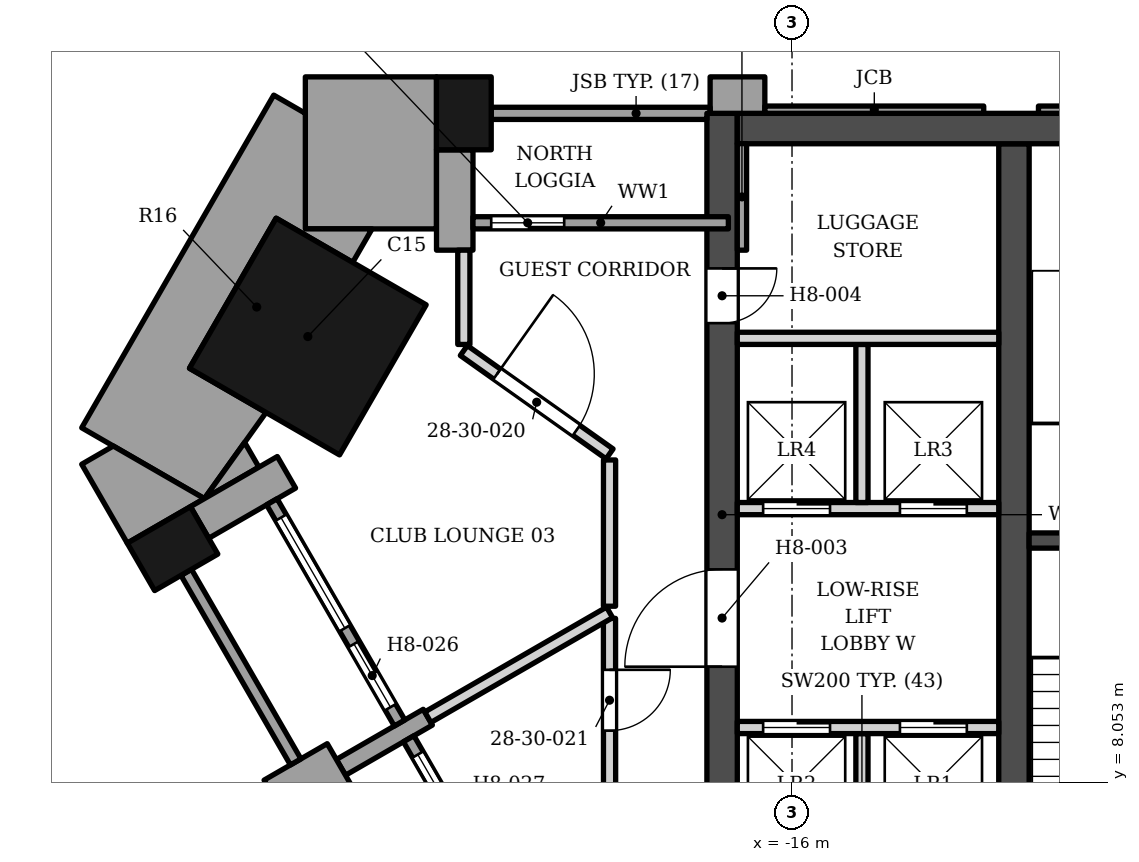
"""IFC4 building model, lengths in metres.
Left out: names, types, materials, properties, quantities, classifications, styles, units other than length and angle.
Written with IfcOpenShell. Run it as: python <this file> out.ifc"""

import sys

from ifc_helpers import new_model, si_unit, direction, frame, frame_2d, origin, origin_2d, place, context, subcontext, project, spatial, polyline, rectangle, outline, extrude, element, fill, save


model = new_model("IFC4")
c1 = context("Model", 3, precision=1e-05, world=origin(), true_north=direction((0.0, 1.0)))
c2 = subcontext(c1, "Body", "Model", "MODEL_VIEW")
j1 = project(units=[si_unit("LENGTHUNIT", "METRE"), si_unit("PLANEANGLEUNIT", "RADIAN")], contexts=[c1])
p1 = place(None, origin())
s1 = spatial("IfcSite", under=j1, at=p1, CompositionType="ELEMENT")
p2 = place(p1, origin())
s2 = spatial("IfcBuilding", under=s1, at=p2, CompositionType="ELEMENT")
p3 = place(p2, frame((0.0, 0.0, 122.4)))
s3 = spatial("IfcBuildingStorey", under=s2, at=p3, CompositionType="ELEMENT", Elevation=122.4)
p4 = place(p3, frame((-16.9, 18.802, 0.0), z_axis=(0.0, 0.0, 1.0), x_axis=(1.0, 0.0, 0.0)))
e1 = element("IfcWall", 1, at=p4, inside=s3, PredefinedType="SHEAR", context=c2, shape_type="SweptSolid", body=[
    extrude(rectangle(XDim=33.8, YDim=0.5, at=frame_2d((16.9, 0.0))), origin(), (0.0, 0.0, 1.0), 3.4),
])
p5 = place(p3, frame((-12.35, 5.253, 0.0), z_axis=(0.0, 0.0, 1.0), x_axis=(0.0, 1.0, 0.0)))
e2 = element("IfcWall", 2, at=p5, inside=s3, PredefinedType="SHEAR", context=c2, shape_type="SweptSolid", body=[
    extrude(rectangle(XDim=13.3, YDim=0.5, at=frame_2d((6.65, 0.0))), origin(), (0.0, 0.0, 1.0), 3.4),
])
p6 = place(p3, frame((-12.1, 12.028, 0.0), z_axis=(0.0, 0.0, 1.0), x_axis=(1.0, 0.0, 0.0)))
e3 = element("IfcWall", 3, at=p6, inside=s3, PredefinedType="SHEAR", context=c2, shape_type="SweptSolid", body=[
    extrude(rectangle(XDim=3.75, YDim=0.25, at=frame_2d((1.875, 0.0))), origin(), (0.0, 0.0, 1.0), 3.4),
])
p7 = place(p3, frame((-17.15, 5.853, 0.0), z_axis=(0.0, 0.0, 1.0), x_axis=(0.0, 1.0, 0.0)))
e4 = element("IfcWall", 4, at=p7, inside=s3, PredefinedType="SHEAR", context=c2, shape_type="SweptSolid", body=[
    extrude(rectangle(XDim=13.2, YDim=0.5, at=frame_2d((6.6, 0.0))), origin(), (0.0, 0.0, 1.0), 3.4),
])
p8 = place(p7, frame((4.1, 0.0, 0.0)))
e5 = element("IfcOpeningElement", 5, at=p8, cuts=e4, PredefinedType="OPENING", context=c2, shape_type="SweptSolid", body=[
    extrude(rectangle(XDim=1.6, YDim=2.1, at=frame_2d((0.8, 1.05))), frame((0.0, 0.26, 0.0), z_axis=(0.0, -1.0, 0.0), x_axis=(1.0, 0.0, 0.0)), (0.0, 0.0, 1.0), 0.52),
])
p9 = place(p7, frame((9.75, 0.0, 0.0)))
e6 = element("IfcOpeningElement", 6, at=p9, cuts=e4, PredefinedType="OPENING", context=c2, shape_type="SweptSolid", body=[
    extrude(rectangle(XDim=0.9, YDim=2.1, at=frame_2d((0.45, 1.05))), frame((0.0, 0.26, 0.0), z_axis=(0.0, -1.0, 0.0), x_axis=(1.0, 0.0, 0.0)), (0.0, 0.0, 1.0), 0.52),
])
p10 = place(p3, frame((-23.963, 15.382, 0.0), z_axis=(0.0, 0.0, 1.0), x_axis=(0.866025403784, -0.5, 0.0)))
e7 = element("IfcColumn", 7, at=p10, inside=s3, PredefinedType="COLUMN", context=c2, shape_type="SweptSolid", body=[
    extrude(rectangle(XDim=2.85, YDim=2.85, at=origin_2d()), origin(), (0.0, 0.0, 1.0), 3.4),
])
for number, where, z_axis, x_axis in (
    (8, (-26.188, 11.894, 0.0), (0.0, 0.0, 1.0), (0.5, -0.866, 0.0)),
    (9, (-21.397, 19.053, 0.0), (0.0, 0.0, 1.0), (-1.0, 0.0, 0.0)),
):
    element("IfcColumn", number, at=place(p3, frame(where, z_axis=z_axis, x_axis=x_axis)), inside=s3, PredefinedType="COLUMN", context=c2, shape_type="SweptSolid", body=[
        extrude(rectangle(XDim=0.9, YDim=1.2, at=origin_2d()), origin(), (0.0, 0.0, 1.0), 3.4),
    ])
p11 = place(p3, frame((-25.744, 12.324, 0.0), z_axis=(0.0, 0.0, 1.0), x_axis=(0.865976140824, 0.500085316245, 0.0)))
e10 = element("IfcWall", 10, at=p11, inside=s3, PredefinedType="SOLIDWALL", context=c2, shape_type="SweptSolid", body=[
    extrude(rectangle(XDim=1.65, YDim=0.6, at=frame_2d((0.825, 0.0))), origin(), (0.0, 0.0, 1.0), 2.63),
])
p12 = place(p3, frame((-24.458, 7.697, 0.0), z_axis=(0.0, 0.0, 1.0), x_axis=(0.865955154139, 0.50012165622, 0.0)))
e11 = element("IfcWall", 11, at=p12, inside=s3, PredefinedType="SOLIDWALL", context=c2, shape_type="SweptSolid", body=[
    extrude(rectangle(XDim=1.2, YDim=0.9, at=frame_2d((0.6, 0.0))), origin(), (0.0, 0.0, 1.0), 2.63),
])
p13 = place(p3, frame((-23.419, 8.297, 0.0), z_axis=(0.0, 0.0, 1.0), x_axis=(0.866040211805, 0.499974350878, 0.0)))
e12 = element("IfcWall", 12, at=p13, inside=s3, PredefinedType="SOLIDWALL", context=c2, shape_type="SweptSolid", body=[
    extrude(rectangle(XDim=1.65, YDim=0.3, at=frame_2d((0.825, 0.0))), origin(), (0.0, 0.0, 1.0), 2.65),
])
p14 = place(p3, frame((-25.963, 11.505, 0.0), z_axis=(0.0, 0.0, 1.0), x_axis=(0.500012057535, -0.866018442252, 0.0)))
e13 = element("IfcWall", 13, at=p14, inside=s3, PredefinedType="SOLIDWALL", context=c2, shape_type="SweptSolid", body=[
    extrude(rectangle(XDim=3.6, YDim=0.2, at=frame_2d((1.8, 0.0))), origin(), (0.0, 0.0, 1.0), 2.63),
])
p15 = place(p3, frame((-24.554, 12.665, 0.0), z_axis=(0.0, 0.0, 1.0), x_axis=(0.500002543286, -0.866023935413, 0.0)))
e14 = element("IfcWall", 14, at=p15, inside=s3, PredefinedType="ELEMENTEDWALL", context=c2, shape_type="SweptSolid", body=[
    extrude(rectangle(XDim=4.2, YDim=0.2, at=frame_2d((2.1, 0.0))), origin(), (0.0, 0.0, 1.0), 2.65),
])
p16 = place(p15, frame((0.3, 0.0, 0.6)))
e15 = element("IfcOpeningElement", 15, at=p16, cuts=e14, PredefinedType="OPENING", context=c2, shape_type="SweptSolid", body=[
    extrude(rectangle(XDim=2.1, YDim=1.8, at=frame_2d((1.05, 0.9))), frame((0.0, 0.11, 0.0), z_axis=(0.0, -1.0, 0.0), x_axis=(1.0, 0.0, 0.0)), (0.0, 0.0, 1.0), 0.22),
])
p17 = place(p15, frame((2.7, 0.0, 0.0)))
e16 = element("IfcOpeningElement", 16, at=p17, cuts=e14, PredefinedType="OPENING", context=c2, shape_type="SweptSolid", body=[
    extrude(rectangle(XDim=1.2, YDim=2.4, at=frame_2d((0.6, 1.2))), frame((0.0, 0.11, 0.0), z_axis=(0.0, -1.0, 0.0), x_axis=(1.0, 0.0, 0.0)), (0.0, 0.0, 1.0), 0.22),
])
p18 = place(p3, frame((-22.304, 8.767, 0.0), z_axis=(0.0, 0.0, 1.0), x_axis=(0.500027713859, -0.866009402589, 0.0)))
e17 = element("IfcWall", 17, at=p18, inside=s3, PredefinedType="ELEMENTEDWALL", context=c2, shape_type="SweptSolid", body=[
    extrude(rectangle(XDim=4.2, YDim=0.2, at=frame_2d((2.1, 0.0))), origin(), (0.0, 0.0, 1.0), 2.65),
])
p19 = place(p18, frame((0.3, 0.0, 0.6)))
e18 = element("IfcOpeningElement", 18, at=p19, cuts=e17, PredefinedType="OPENING", context=c2, shape_type="SweptSolid", body=[
    extrude(rectangle(XDim=2.1, YDim=1.8, at=frame_2d((1.05, 0.9))), frame((0.0, 0.11, 0.0), z_axis=(0.0, -1.0, 0.0), x_axis=(1.0, 0.0, 0.0)), (0.0, 0.0, 1.0), 0.22),
])
p20 = place(p18, frame((2.7, 0.0, 0.0)))
e19 = element("IfcOpeningElement", 19, at=p20, cuts=e17, PredefinedType="OPENING", context=c2, shape_type="SweptSolid", body=[
    extrude(rectangle(XDim=1.2, YDim=2.4, at=frame_2d((0.6, 1.2))), frame((0.0, 0.11, 0.0), z_axis=(0.0, -1.0, 0.0), x_axis=(1.0, 0.0, 0.0)), (0.0, 0.0, 1.0), 0.22),
])
p21 = place(p3, origin())
e20 = element("IfcWall", 20, at=p21, inside=s3, PredefinedType="SOLIDWALL", context=c2, shape_type="SweptSolid", body=[
    extrude(outline(polyline([(-16.447, 19.052), (-16.447, 19.653), (-17.347, 19.653), (-17.347, 19.052), (-16.447, 19.052)])), origin(), (0.0, 0.0, 1.0), 2.65),
])
p22 = place(p3, origin())
e21 = element("IfcWall", 21, at=p22, inside=s3, PredefinedType="SOLIDWALL", context=c2, shape_type="SweptSolid", body=[
    extrude(outline(polyline([(-16.9, 18.555), (-16.747, 18.555), (-16.747, 16.802), (-16.9, 16.802), (-16.9, 18.555)])), origin(), (0.0, 0.0, 1.0), 2.65),
])
p23 = place(p3, origin())
e22 = element("IfcWall", 22, at=p23, inside=s3, PredefinedType="SOLIDWALL", context=c2, shape_type="SweptSolid", body=[
    extrude(outline(polyline([(-21.847, 18.453), (-21.847, 16.802), (-21.247, 16.802), (-21.247, 18.453), (-21.847, 18.453)])), origin(), (0.0, 0.0, 1.0), 2.63),
])
p24 = place(p3, origin())
e23 = element("IfcWall", 23, at=p24, inside=s3, PredefinedType="ELEMENTEDWALL", context=c2, shape_type="SweptSolid", body=[
    extrude(outline(polyline([(-11.947, 19.173), (-11.947, 19.052), (-8.347, 19.052), (-8.347, 19.173), (-11.947, 19.173)])), origin(), (0.0, 0.0, 1.0), 2.65),
])
p25 = place(p3, origin())
e24 = element("IfcWall", 24, at=p25, inside=s3, PredefinedType="SOLIDWALL", context=c2, shape_type="SweptSolid", body=[
    extrude(outline(polyline([(-16.446, 19.173), (-16.446, 19.052), (-12.847, 19.052), (-12.847, 19.173), (-16.446, 19.173)])), origin(), (0.0, 0.0, 1.0), 2.65),
])
p26 = place(p3, origin())
e25 = element("IfcWall", 25, at=p26, inside=s3, PredefinedType="SOLIDWALL", context=c2, shape_type="SweptSolid", body=[
    extrude(outline(polyline([(-20.947, 19.153), (-20.947, 18.953), (-17.4, 18.953), (-17.4, 19.052), (-17.347, 19.052), (-17.347, 19.153), (-20.947, 19.153)])), origin(), (0.0, 0.0, 1.0), 2.65),
])
p27 = place(p3, frame((-17.047, 17.252, 0.0), z_axis=(0.0, 0.0, 1.0), x_axis=(-1.0, 0.0, 0.0)))
e26 = element("IfcWall", 26, at=p27, inside=s3, PredefinedType="ELEMENTEDWALL", context=c2, shape_type="SweptSolid", body=[
    extrude(rectangle(XDim=4.2, YDim=0.2, at=frame_2d((2.1, 0.0))), origin(), (0.0, 0.0, 1.0), 2.65),
])
p28 = place(p27, frame((2.7, 0.0, 0.0)))
e27 = element("IfcOpeningElement", 27, at=p28, cuts=e26, PredefinedType="OPENING", context=c2, shape_type="SweptSolid", body=[
    extrude(rectangle(XDim=1.2, YDim=2.4, at=frame_2d((0.6, 1.2))), frame((0.0, 0.11, 0.0), z_axis=(0.0, -1.0, 0.0), x_axis=(1.0, 0.0, 0.0)), (0.0, 0.0, 1.0), 0.22),
])
p29 = place(p3, origin())
e28 = element("IfcWall", 28, at=p29, inside=s3, PredefinedType="SOLIDWALL", context=c2, shape_type="SweptSolid", body=[
    extrude(outline(polyline([(-24.004, 17.153), (-21.847, 17.153), (-21.847, 18.453), (-21.847, 18.453), (-21.847, 19.653), (-24.004, 19.653), (-24.004, 17.153)])), origin(), (0.0, 0.0, 1.0), 2.63),
])
p30 = place(p3, origin())
e29 = element("IfcWall", 29, at=p30, inside=s3, PredefinedType="SOLIDWALL", context=c2, shape_type="SweptSolid", body=[
    extrude(outline(polyline([(-23.225, 16.601), (-22.907, 17.153), (-24.004, 17.153), (-24.004, 19.052), (-24.523, 19.353), (-27.682, 13.882), (-25.664, 12.717), (-24.65, 14.133), (-25.91, 14.86), (-24.485, 17.329), (-23.225, 16.601)])), origin(), (0.0, 0.0, 1.0), 2.63),
])
p31 = place(p3, origin())
e30 = element("IfcWall", 30, at=p31, inside=s3, PredefinedType="SOLIDWALL", context=c2, shape_type="SweptSolid", body=[
    extrude(outline(polyline([(-27.162, 13.582), (-27.682, 13.282), (-26.933, 11.984), (-25.664, 12.717), (-27.162, 13.582)])), origin(), (0.0, 0.0, 1.0), 2.63),
])
p32 = place(p3, origin())
e31 = element("IfcWall", 31, at=p32, inside=s3, PredefinedType="SOLIDWALL", context=c2, shape_type="SweptSolid", body=[
    extrude(outline(polyline([(-24.768, 13.234), (-25.002, 13.641), (-25.664, 12.717), (-24.768, 13.234)])), origin(), (0.0, 0.0, 1.0), 2.63),
])
p33 = place(p3, frame((-14.85, 6.353, 0.0), z_axis=(0.0, 0.0, 1.0), x_axis=(0.0, 1.0, 0.0)))
e32 = element("IfcWall", 32, at=p33, inside=s3, PredefinedType="SOLIDWALL", context=c2, shape_type="SweptSolid", body=[
    extrude(rectangle(XDim=2.5, YDim=0.2, at=frame_2d((1.25, 0.0))), origin(), (0.0, 0.0, 1.0), 3.23),
])
p34 = place(p3, frame((-16.9, 8.953, 0.0), z_axis=(0.0, 0.0, 1.0), x_axis=(1.0, 0.0, 0.0)))
e33 = element("IfcWall", 33, at=p34, inside=s3, PredefinedType="SOLIDWALL", context=c2, shape_type="SweptSolid", body=[
    extrude(rectangle(XDim=4.3, YDim=0.2, at=frame_2d((2.15, 0.0))), origin(), (0.0, 0.0, 1.0), 3.23),
])
p35 = place(p34, frame((2.675, 0.0, 0.0)))
e34 = element("IfcOpeningElement", 34, at=p35, cuts=e33, PredefinedType="OPENING", context=c2, shape_type="SweptSolid", body=[
    extrude(rectangle(XDim=1.1, YDim=2.1, at=frame_2d((0.55, 1.05))), frame((0.0, 0.11, 0.0), z_axis=(0.0, -1.0, 0.0), x_axis=(1.0, 0.0, 0.0)), (0.0, 0.0, 1.0), 0.22),
])
p36 = place(p34, frame((0.425, 0.0, 0.0)))
e35 = element("IfcOpeningElement", 35, at=p36, cuts=e33, PredefinedType="OPENING", context=c2, shape_type="SweptSolid", body=[
    extrude(rectangle(XDim=1.1, YDim=2.1, at=frame_2d((0.55, 1.05))), frame((0.0, 0.11, 0.0), z_axis=(0.0, -1.0, 0.0), x_axis=(1.0, 0.0, 0.0)), (0.0, 0.0, 1.0), 0.22),
])
p37 = place(p3, frame((-16.9, 12.552, 0.0), z_axis=(0.0, 0.0, 1.0), x_axis=(1.0, 0.0, 0.0)))
e36 = element("IfcWall", 36, at=p37, inside=s3, PredefinedType="SOLIDWALL", context=c2, shape_type="SweptSolid", body=[
    extrude(rectangle(XDim=4.3, YDim=0.2, at=frame_2d((2.15, 0.0))), origin(), (0.0, 0.0, 1.0), 3.23),
])
p38 = place(p37, frame((2.675, 0.0, 0.0)))
e37 = element("IfcOpeningElement", 37, at=p38, cuts=e36, PredefinedType="OPENING", context=c2, shape_type="SweptSolid", body=[
    extrude(rectangle(XDim=1.1, YDim=2.1, at=frame_2d((0.55, 1.05))), frame((0.0, 0.11, 0.0), z_axis=(0.0, -1.0, 0.0), x_axis=(1.0, 0.0, 0.0)), (0.0, 0.0, 1.0), 0.22),
])
p39 = place(p37, frame((0.425, 0.0, 0.0)))
e38 = element("IfcOpeningElement", 38, at=p39, cuts=e36, PredefinedType="OPENING", context=c2, shape_type="SweptSolid", body=[
    extrude(rectangle(XDim=1.1, YDim=2.1, at=frame_2d((0.55, 1.05))), frame((0.0, 0.11, 0.0), z_axis=(0.0, -1.0, 0.0), x_axis=(1.0, 0.0, 0.0)), (0.0, 0.0, 1.0), 0.22),
])
p40 = place(p3, frame((-14.85, 12.653, 0.0), z_axis=(0.0, 0.0, 1.0), x_axis=(0.0, 1.0, 0.0)))
e39 = element("IfcWall", 39, at=p40, inside=s3, PredefinedType="SOLIDWALL", context=c2, shape_type="SweptSolid", body=[
    extrude(rectangle(XDim=2.6, YDim=0.2, at=frame_2d((1.3, 0.0))), origin(), (0.0, 0.0, 1.0), 3.23),
])
p41 = place(p3, frame((-16.9, 15.353, 0.0), z_axis=(0.0, 0.0, 1.0), x_axis=(1.0, 0.0, 0.0)))
e40 = element("IfcWall", 40, at=p41, inside=s3, PredefinedType="SOLIDWALL", context=c2, shape_type="SweptSolid", body=[
    extrude(rectangle(XDim=4.3, YDim=0.2, at=frame_2d((2.15, 0.0))), origin(), (0.0, 0.0, 1.0), 3.23),
])
p42 = place(p3, frame((-19.002, 10.747, 0.0), z_axis=(0.0, 0.0, 1.0), x_axis=(0.000524200522, -0.999999862607, 0.0)))
e41 = element("IfcWall", 41, at=p42, inside=s3, PredefinedType="PARTITIONING", context=c2, shape_type="SweptSolid", body=[
    extrude(rectangle(XDim=2.794, YDim=0.2, at=frame_2d((1.397, 0.0))), origin(), (0.0, 0.0, 1.0), 3.23),
])
p43 = place(p42, frame((0.846, 0.0, 0.0)))
e42 = element("IfcOpeningElement", 42, at=p43, cuts=e41, PredefinedType="OPENING", context=c2, shape_type="SweptSolid", body=[
    extrude(rectangle(XDim=1.0, YDim=2.1, at=frame_2d((0.5, 1.05))), frame((0.0, 0.11, 0.0), z_axis=(0.0, -1.0, 0.0), x_axis=(1.0, 0.0, 0.0)), (0.0, 0.0, 1.0), 0.22),
])
p44 = place(p3, frame((-21.99, 9.122, 0.0), z_axis=(0.0, 0.0, 1.0), x_axis=(0.866285697387, 0.499548887001, 0.0)))
e43 = element("IfcWall", 43, at=p44, inside=s3, PredefinedType="PARTITIONING", context=c2, shape_type="SweptSolid", body=[
    extrude(rectangle(XDim=3.45, YDim=0.2, at=frame_2d((1.725, 0.0))), origin(), (0.0, 0.0, 1.0), 3.23),
])
p45 = place(p3, frame((-19.002, 10.947, 0.0), z_axis=(0.0, 0.0, 1.0), x_axis=(0.000609075108, 0.999999814514, 0.0)))
e44 = element("IfcWall", 44, at=p45, inside=s3, PredefinedType="PARTITIONING", context=c2, shape_type="SweptSolid", body=[
    extrude(rectangle(XDim=2.405, YDim=0.2, at=frame_2d((1.203, 0.0))), origin(), (0.0, 0.0, 1.0), 3.23),
])
p46 = place(p3, frame((-21.397, 15.152, 0.0), z_axis=(0.0, 0.0, 1.0), x_axis=(0.815699386654, -0.578476024232, 0.0)))
e45 = element("IfcWall", 45, at=p46, inside=s3, PredefinedType="PARTITIONING", context=c2, shape_type="SweptSolid", body=[
    extrude(rectangle(XDim=2.938, YDim=0.2, at=frame_2d((1.469, 0.0))), origin(), (0.0, 0.0, 1.0), 3.23),
])
p47 = place(p46, frame((0.669, 0.0, 0.0)))
e46 = element("IfcOpeningElement", 46, at=p47, cuts=e45, PredefinedType="OPENING", context=c2, shape_type="SweptSolid", body=[
    extrude(rectangle(XDim=1.6, YDim=2.1, at=frame_2d((0.8, 1.05))), frame((0.0, 0.11, 0.0), z_axis=(0.0, -1.0, 0.0), x_axis=(1.0, 0.0, 0.0)), (0.0, 0.0, 1.0), 0.22),
])
p48 = place(p3, frame((-21.397, 16.802, 0.0), z_axis=(0.0, 0.0, 1.0), x_axis=(0.000157480313, -0.9999999876, 0.0)))
e47 = element("IfcWall", 47, at=p48, inside=s3, PredefinedType="PARTITIONING", context=c2, shape_type="SweptSolid", body=[
    extrude(rectangle(XDim=1.55, YDim=0.2, at=frame_2d((0.775, 0.0))), origin(), (0.0, 0.0, 1.0), 3.23),
])
p49 = place(p16, origin())
e48 = element("IfcWindow", 48, at=p49, inside=s3, PartitioningType="SINGLE_PANEL", PredefinedType="WINDOW", context=c2, shape_type="SweptSolid", body=[
    extrude(rectangle(XDim=2.1, YDim=1.8, at=frame_2d((1.05, 0.9))), frame((0.0, 0.03, 0.0), z_axis=(0.0, -1.0, 0.0), x_axis=(1.0, 0.0, 0.0)), (0.0, 0.0, 1.0), 0.06),
])
fill(e15, e48)
p50 = place(p17, origin())
e49 = element("IfcDoor", 49, at=p50, inside=s3, OperationType="SINGLE_SWING_LEFT", PredefinedType="DOOR", context=c2, shape_type="SweptSolid", body=[
    extrude(rectangle(XDim=1.2, YDim=2.4, at=frame_2d((0.6, 1.2))), frame((0.0, 0.025, 0.0), z_axis=(0.0, -1.0, 0.0), x_axis=(1.0, 0.0, 0.0)), (0.0, 0.0, 1.0), 0.05),
])
fill(e16, e49)
p51 = place(p19, origin())
e50 = element("IfcWindow", 50, at=p51, inside=s3, PartitioningType="SINGLE_PANEL", PredefinedType="WINDOW", context=c2, shape_type="SweptSolid", body=[
    extrude(rectangle(XDim=2.1, YDim=1.8, at=frame_2d((1.05, 0.9))), frame((0.0, 0.03, 0.0), z_axis=(0.0, -1.0, 0.0), x_axis=(1.0, 0.0, 0.0)), (0.0, 0.0, 1.0), 0.06),
])
fill(e18, e50)
p52 = place(p28, origin())
e51 = element("IfcDoor", 51, at=p52, inside=s3, OperationType="SINGLE_SWING_LEFT", PredefinedType="DOOR", context=c2, shape_type="SweptSolid", body=[
    extrude(rectangle(XDim=1.2, YDim=2.4, at=frame_2d((0.6, 1.2))), frame((0.0, 0.025, 0.0), z_axis=(0.0, -1.0, 0.0), x_axis=(1.0, 0.0, 0.0)), (0.0, 0.0, 1.0), 0.05),
])
fill(e27, e51)
p53 = place(p35, origin())
e52 = element("IfcDoor", 52, at=p53, inside=s3, OperationType="DOUBLE_DOOR_SLIDING", PredefinedType="DOOR", context=c2, shape_type="SweptSolid", body=[
    extrude(rectangle(XDim=1.1, YDim=2.1, at=frame_2d((0.55, 1.05))), frame((0.0, 0.025, 0.0), z_axis=(0.0, -1.0, 0.0), x_axis=(1.0, 0.0, 0.0)), (0.0, 0.0, 1.0), 0.05),
])
fill(e34, e52)
p54 = place(p38, origin())
e53 = element("IfcDoor", 53, at=p54, inside=s3, OperationType="DOUBLE_DOOR_SLIDING", PredefinedType="DOOR", context=c2, shape_type="SweptSolid", body=[
    extrude(rectangle(XDim=1.1, YDim=2.1, at=frame_2d((0.55, 1.05))), frame((0.0, 0.025, 0.0), z_axis=(0.0, -1.0, 0.0), x_axis=(1.0, 0.0, 0.0)), (0.0, 0.0, 1.0), 0.05),
])
fill(e37, e53)
p55 = place(p36, origin())
e54 = element("IfcDoor", 54, at=p55, inside=s3, OperationType="DOUBLE_DOOR_SLIDING", PredefinedType="DOOR", context=c2, shape_type="SweptSolid", body=[
    extrude(rectangle(XDim=1.1, YDim=2.1, at=frame_2d((0.55, 1.05))), frame((0.0, 0.025, 0.0), z_axis=(0.0, -1.0, 0.0), x_axis=(1.0, 0.0, 0.0)), (0.0, 0.0, 1.0), 0.05),
])
fill(e35, e54)
p56 = place(p39, origin())
e55 = element("IfcDoor", 55, at=p56, inside=s3, OperationType="DOUBLE_DOOR_SLIDING", PredefinedType="DOOR", context=c2, shape_type="SweptSolid", body=[
    extrude(rectangle(XDim=1.1, YDim=2.1, at=frame_2d((0.55, 1.05))), frame((0.0, 0.025, 0.0), z_axis=(0.0, -1.0, 0.0), x_axis=(1.0, 0.0, 0.0)), (0.0, 0.0, 1.0), 0.05),
])
fill(e38, e55)
p57 = place(p8, origin())
e56 = element("IfcDoor", 56, at=p57, inside=s3, OperationType="DOUBLE_DOOR_SINGLE_SWING", PredefinedType="DOOR", context=c2, shape_type="SweptSolid", body=[
    extrude(rectangle(XDim=1.6, YDim=2.1, at=frame_2d((0.8, 1.05))), frame((0.0, 0.025, 0.0), z_axis=(0.0, -1.0, 0.0), x_axis=(1.0, 0.0, 0.0)), (0.0, 0.0, 1.0), 0.05),
])
fill(e5, e56)
p58 = place(p9, origin())
e57 = element("IfcDoor", 57, at=p58, inside=s3, OperationType="SINGLE_SWING_RIGHT", PredefinedType="DOOR", context=c2, shape_type="SweptSolid", body=[
    extrude(rectangle(XDim=0.9, YDim=2.1, at=frame_2d((0.45, 1.05))), frame((0.0, 0.025, 0.0), z_axis=(0.0, -1.0, 0.0), x_axis=(1.0, 0.0, 0.0)), (0.0, 0.0, 1.0), 0.05),
])
fill(e6, e57)
p59 = place(p47, origin())
e58 = element("IfcDoor", 58, at=p59, inside=s3, OperationType="DOUBLE_DOOR_SINGLE_SWING", PredefinedType="DOOR", context=c2, shape_type="SweptSolid", body=[
    extrude(rectangle(XDim=1.6, YDim=2.1, at=frame_2d((0.8, 1.05))), frame((0.0, 0.025, 0.0), z_axis=(0.0, -1.0, 0.0), x_axis=(1.0, 0.0, 0.0)), (0.0, 0.0, 1.0), 0.05),
])
fill(e46, e58)
p60 = place(p43, origin())
e59 = element("IfcDoor", 59, at=p60, inside=s3, OperationType="SINGLE_SWING_LEFT", PredefinedType="DOOR", context=c2, shape_type="SweptSolid", body=[
    extrude(rectangle(XDim=1.0, YDim=2.1, at=frame_2d((0.5, 1.05))), frame((0.0, 0.025, 0.0), z_axis=(0.0, -1.0, 0.0), x_axis=(1.0, 0.0, 0.0)), (0.0, 0.0, 1.0), 0.05),
])
fill(e42, e59)
save(model, sys.argv[1])
